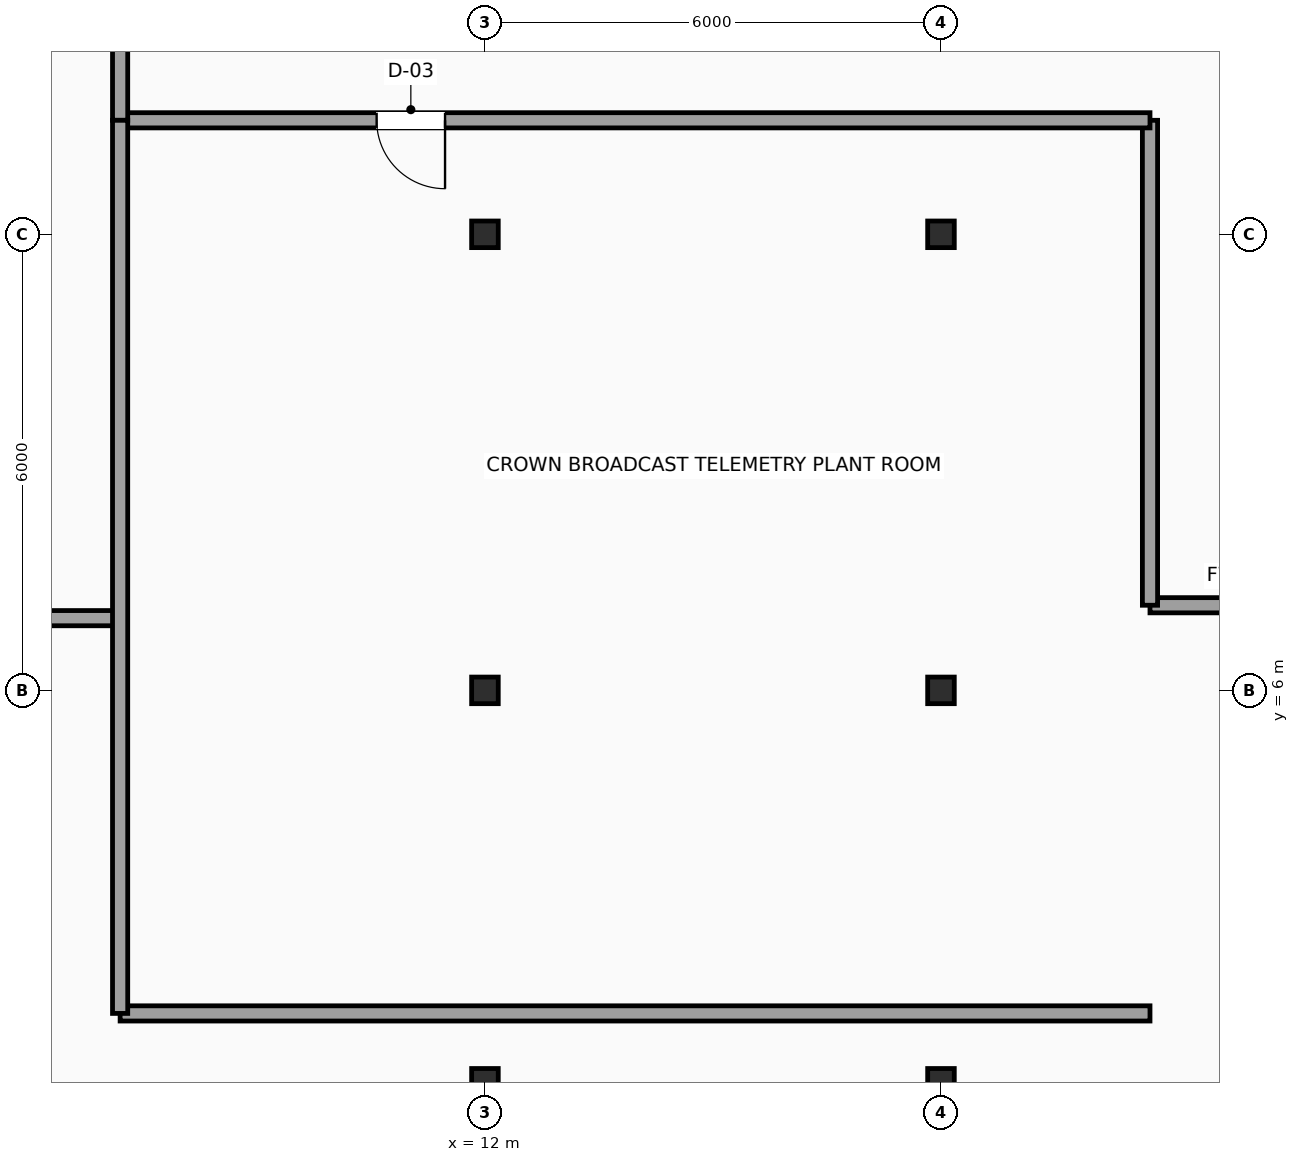
"""IFC4 building model, lengths in metres.
Left out: names, types, materials, properties, quantities, classifications, styles, units other than length and angle.
Written with IfcOpenShell. Run it as: python <this file> out.ifc"""

import sys

from ifc_helpers import new_model, si_unit, direction, frame, frame_2d, origin, origin_2d, place, context, subcontext, project, spatial, rectangle, hollow_rectangle, extrude, element, fill, save


model = new_model("IFC4")
c1 = context("Model", 3, precision=1e-05, world=origin(), true_north=direction((0.0, 1.0)))
c2 = subcontext(c1, "Body", "Model", "MODEL_VIEW")
j1 = project(units=[si_unit("LENGTHUNIT", "METRE"), si_unit("PLANEANGLEUNIT", "RADIAN")], contexts=[c1])
p1 = place(None, origin())
s1 = spatial("IfcSite", under=j1, at=p1, CompositionType="ELEMENT")
p2 = place(p1, origin())
s2 = spatial("IfcBuilding", under=s1, at=p2, CompositionType="ELEMENT")
p3 = place(p2, frame((0.0, 0.0, 305.7)))
s3 = spatial("IfcBuildingStorey", under=s2, at=p3, CompositionType="ELEMENT", Elevation=305.7)
for number, where, z_axis, x_axis in (
    (1, (12.0, 0.85, 0.0), (0.0, 0.0, 1.0), (1.0, 0.0, 0.0)),
    (2, (12.0, 6.0, 0.0), (0.0, 0.0, 1.0), (1.0, 0.0, 0.0)),
    (3, (12.0, 12.0, 0.0), (0.0, 0.0, 1.0), (1.0, 0.0, 0.0)),
    (4, (18.0, 0.85, 0.0), (0.0, 0.0, 1.0), (1.0, 0.0, 0.0)),
    (5, (18.0, 6.0, 0.0), (0.0, 0.0, 1.0), (1.0, 0.0, 0.0)),
    (6, (18.0, 12.0, 0.0), (0.0, 0.0, 1.0), (1.0, 0.0, 0.0)),
):
    element("IfcColumn", number, at=place(p3, frame(where, z_axis=z_axis, x_axis=x_axis)), inside=s3, PredefinedType="COLUMN", context=c2, shape_type="SweptSolid", body=[
        extrude(hollow_rectangle(XDim=0.35, YDim=0.35, WallThickness=0.016, InnerFilletRadius=0.016, OuterFilletRadius=0.032, at=origin_2d()), origin(), (0.0, 0.0, 1.0), 4.8),
    ])
p4 = place(p3, frame((23.98, 7.12, 0.0), z_axis=(0.0, 0.0, 1.0), x_axis=(-1.0, 0.0, 0.0)))
e7 = element("IfcWall", 7, at=p4, inside=s3, PredefinedType="SOLIDWALL", context=c2, shape_type="SweptSolid", body=[
    extrude(rectangle(XDim=3.23, YDim=0.2, at=frame_2d((1.615, 0.0))), origin(), (0.0, 0.0, 1.0), 4.55),
])
p5 = place(p3, frame((20.75, 7.12, 0.0), z_axis=(0.0, 0.0, 1.0), x_axis=(0.0, 1.0, 0.0)))
e8 = element("IfcWall", 8, at=p5, inside=s3, PredefinedType="SOLIDWALL", context=c2, shape_type="SweptSolid", body=[
    extrude(rectangle(XDim=6.38, YDim=0.2, at=frame_2d((3.19, 0.0))), origin(), (0.0, 0.0, 1.0), 4.55),
])
p6 = place(p3, frame((20.75, 13.5, 0.0), z_axis=(0.0, 0.0, 1.0), x_axis=(-1.0, 0.0, 0.0)))
e9 = element("IfcWall", 9, at=p6, inside=s3, PredefinedType="SOLIDWALL", context=c2, shape_type="SweptSolid", body=[
    extrude(rectangle(XDim=13.55, YDim=0.2, at=frame_2d((6.775, 0.0))), origin(), (0.0, 0.0, 1.0), 4.55),
])
p7 = place(p6, frame((9.275, 0.0, 0.0)))
e10 = element("IfcOpeningElement", 10, at=p7, cuts=e9, PredefinedType="OPENING", context=c2, shape_type="SweptSolid", body=[
    extrude(rectangle(XDim=0.9, YDim=2.15, at=frame_2d((0.45, 1.075))), frame((0.0, 0.11, 0.0), z_axis=(0.0, -1.0, 0.0), x_axis=(1.0, 0.0, 0.0)), (0.0, 0.0, 1.0), 0.22),
])
p8 = place(p3, frame((7.2, 13.5, 0.0), z_axis=(0.0, 0.0, 1.0), x_axis=(0.0, 1.0, 0.0)))
e11 = element("IfcWall", 11, at=p8, inside=s3, PredefinedType="SOLIDWALL", context=c2, shape_type="SweptSolid", body=[
    extrude(rectangle(XDim=2.95, YDim=0.2, at=frame_2d((1.475, 0.0))), origin(), (0.0, 0.0, 1.0), 4.55),
])
p9 = place(p8, frame((0.975, 0.0, 0.0)))
e12 = element("IfcOpeningElement", 12, at=p9, cuts=e11, PredefinedType="OPENING", context=c2, shape_type="SweptSolid", body=[
    extrude(rectangle(XDim=0.9, YDim=2.15, at=frame_2d((0.45, 1.075))), frame((0.0, 0.11, 0.0), z_axis=(0.0, -1.0, 0.0), x_axis=(1.0, 0.0, 0.0)), (0.0, 0.0, 1.0), 0.22),
])
p10 = place(p3, frame((0.85, 6.95, 0.0), z_axis=(0.0, 0.0, 1.0), x_axis=(1.0, 0.0, 0.0)))
e13 = element("IfcWall", 13, at=p10, inside=s3, PredefinedType="SOLIDWALL", context=c2, shape_type="SweptSolid", body=[
    extrude(rectangle(XDim=6.35, YDim=0.2, at=frame_2d((3.175, 0.0))), origin(), (0.0, 0.0, 1.0), 4.55),
])
p11 = place(p3, frame((7.2, 1.75, 0.0), z_axis=(0.0, 0.0, 1.0), x_axis=(1.0, 0.0, 0.0)))
e14 = element("IfcWall", 14, at=p11, inside=s3, PredefinedType="SOLIDWALL", context=c2, shape_type="SweptSolid", body=[
    extrude(rectangle(XDim=13.55, YDim=0.2, at=frame_2d((6.775, 0.0))), origin(), (0.0, 0.0, 1.0), 4.55),
])
p12 = place(p3, frame((7.2, 1.75, 0.0), z_axis=(0.0, 0.0, 1.0), x_axis=(0.0, 1.0, 0.0)))
e15 = element("IfcWall", 15, at=p12, inside=s3, PredefinedType="SOLIDWALL", context=c2, shape_type="SweptSolid", body=[
    extrude(rectangle(XDim=11.75, YDim=0.2, at=frame_2d((5.875, 0.0))), origin(), (0.0, 0.0, 1.0), 4.55),
])
p13 = place(p7, origin())
e16 = element("IfcDoor", 16, at=p13, inside=s3, OperationType="SINGLE_SWING_LEFT", PredefinedType="DOOR", context=c2, shape_type="SweptSolid", body=[
    extrude(rectangle(XDim=0.9, YDim=2.15, at=frame_2d((0.45, 1.075))), frame((0.0, 0.025, 0.0), z_axis=(0.0, -1.0, 0.0), x_axis=(1.0, 0.0, 0.0)), (0.0, 0.0, 1.0), 0.05),
])
fill(e10, e16)
save(model, sys.argv[1])
